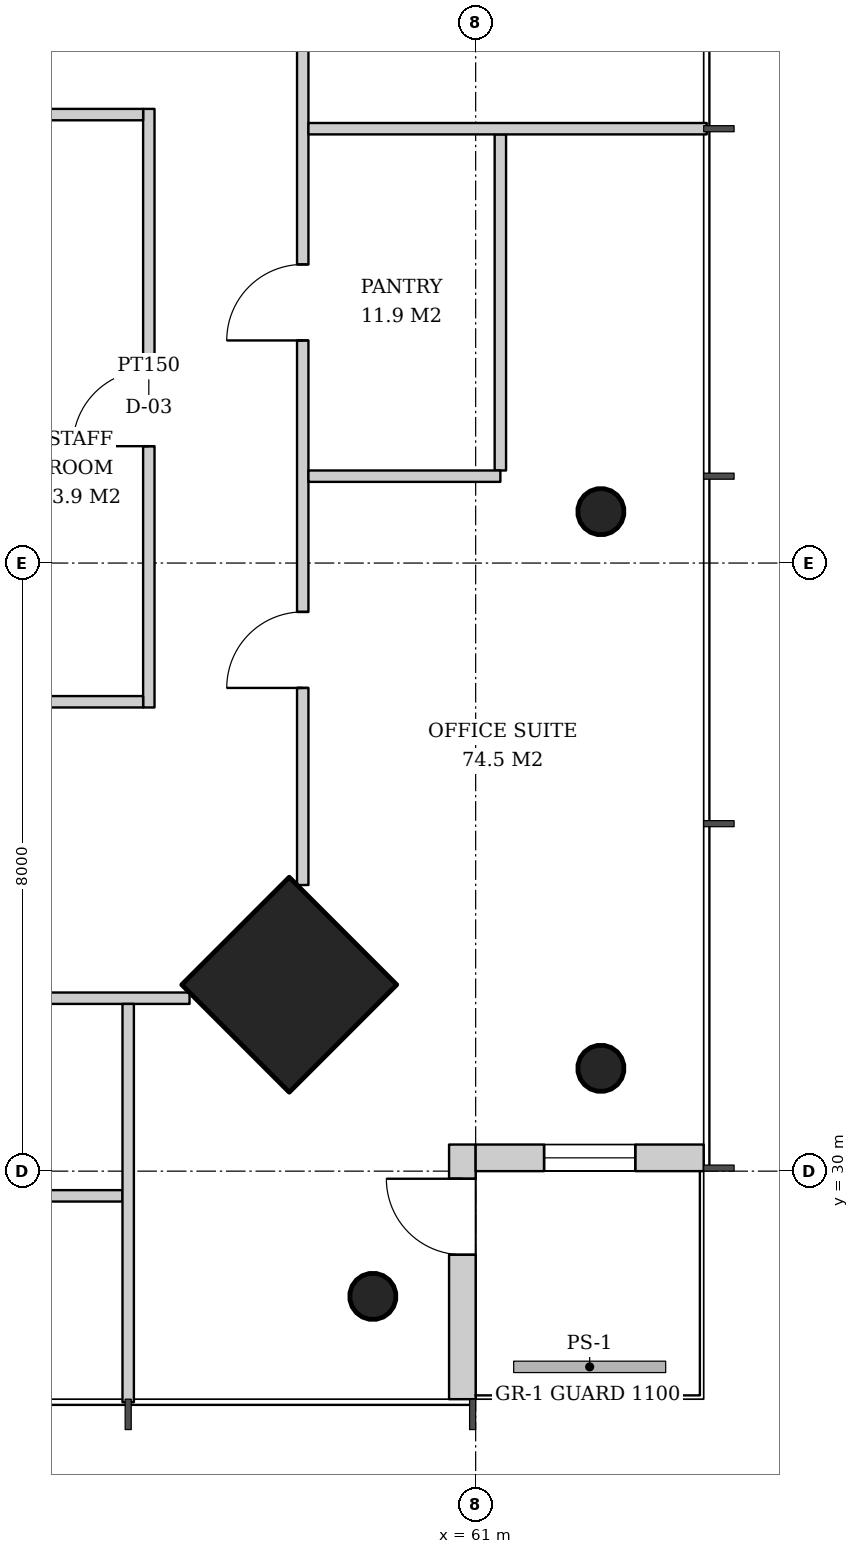
"""IFC4 building model, lengths in metres.
Left out: names, types, materials, properties, quantities, classifications, styles, units other than length and angle.
Written with IfcOpenShell. Run it as: python <this file> out.ifc"""

import sys

from ifc_helpers import new_model, si_unit, direction, frame, frame_2d, origin, origin_2d, place, context, subcontext, project, spatial, rectangle, hollow_circle, extrude, element, fill, save


model = new_model("IFC4")
c1 = context("Model", 3, precision=1e-05, world=origin(), true_north=direction((0.0, 1.0)))
c2 = subcontext(c1, "Body", "Model", "MODEL_VIEW")
j1 = project(units=[si_unit("LENGTHUNIT", "METRE"), si_unit("PLANEANGLEUNIT", "RADIAN")], contexts=[c1])
p1 = place(None, origin())
s1 = spatial("IfcSite", under=j1, at=p1, CompositionType="ELEMENT")
p2 = place(p1, origin())
s2 = spatial("IfcBuilding", under=s1, at=p2, CompositionType="ELEMENT")
p3 = place(p2, frame((0.0, 0.0, 218.6)))
s3 = spatial("IfcBuildingStorey", under=s2, at=p3, CompositionType="ELEMENT", Elevation=218.6)
p4 = place(p3, frame((62.686, 31.314, 0.0), z_axis=(-0.031964207655, 0.031964207655, 0.998977766949), x_axis=(-0.707106781187, -0.707106781187, 0.0)))
e1 = element("IfcColumn", 1, at=p4, inside=s3, PredefinedType="COLUMN", context=c2, shape_type="SweptSolid", body=[
    extrude(hollow_circle(Radius=0.305, WallThickness=0.025, at=origin_2d()), origin(), (0.0, 0.0, 1.0), 3.804),
])
p5 = place(p3, frame((62.686, 38.657, 0.0), z_axis=(-0.031976494272, 0.015924037308, 0.99936176075), x_axis=(-0.445775033553, -0.895145027055, 0.0)))
e2 = element("IfcColumn", 2, at=p5, inside=s3, PredefinedType="COLUMN", context=c2, shape_type="SweptSolid", body=[
    extrude(hollow_circle(Radius=0.305, WallThickness=0.025, at=origin_2d()), origin(), (0.0, 0.0, 1.0), 3.802),
])
p6 = place(p3, frame((58.586, 32.414, 0.0), z_axis=(-0.031900153262, 0.031900153262, 0.998981861919), x_axis=(-0.707106781187, -0.707106781187, 0.0)))
e3 = element("IfcColumn", 3, at=p6, inside=s3, PredefinedType="COLUMN", context=c2, shape_type="SweptSolid", body=[
    extrude(rectangle(XDim=2.0, YDim=2.0, at=origin_2d()), origin(), (0.0, 0.0, 1.0), 3.804),
])
p7 = place(p3, frame((59.686, 28.314, 0.0), z_axis=(-0.031964207655, 0.031964207655, 0.998977766949), x_axis=(-0.707106781187, -0.707106781187, 0.0)))
e4 = element("IfcColumn", 4, at=p7, inside=s3, PredefinedType="COLUMN", context=c2, shape_type="SweptSolid", body=[
    extrude(hollow_circle(Radius=0.305, WallThickness=0.025, at=origin_2d()), origin(), (0.0, 0.0, 1.0), 3.804),
])
p8 = place(p3, frame((60.825, 27.0, 0.0), z_axis=(0.0, 0.0, 1.0), x_axis=(0.0, 1.0, 0.0)))
e5 = element("IfcWall", 5, at=p8, inside=s3, PredefinedType="SOLIDWALL", context=c2, shape_type="SweptSolid", body=[
    extrude(rectangle(XDim=3.35, YDim=0.35, at=frame_2d((1.675, 0.0))), origin(), (0.0, 0.0, 1.0), 3.62),
])
p9 = place(p8, frame((1.9, 0.0, 0.0)))
e6 = element("IfcOpeningElement", 6, at=p9, cuts=e5, PredefinedType="OPENING", context=c2, shape_type="SweptSolid", body=[
    extrude(rectangle(XDim=1.0, YDim=2.4, at=frame_2d((0.5, 1.2))), frame((0.0, 0.185, 0.0), z_axis=(0.0, -1.0, 0.0), x_axis=(1.0, 0.0, 0.0)), (0.0, 0.0, 1.0), 0.37),
])
p10 = place(p3, frame((61.0, 30.175, 0.0), z_axis=(0.0, 0.0, 1.0), x_axis=(1.0, 0.0, 0.0)))
e7 = element("IfcWall", 7, at=p10, inside=s3, PredefinedType="SOLIDWALL", context=c2, shape_type="SweptSolid", body=[
    extrude(rectangle(XDim=3.0, YDim=0.35, at=frame_2d((1.5, 0.0))), origin(), (0.0, 0.0, 1.0), 3.62),
])
p11 = place(p10, frame((0.9, 0.0, 0.6)))
e8 = element("IfcOpeningElement", 8, at=p11, cuts=e7, PredefinedType="OPENING", context=c2, shape_type="SweptSolid", body=[
    extrude(rectangle(XDim=1.2, YDim=2.55, at=frame_2d((0.6, 1.275))), frame((0.0, 0.185, 0.0), z_axis=(0.0, -1.0, 0.0), x_axis=(1.0, 0.0, 0.0)), (0.0, 0.0, 1.0), 0.37),
])
p12 = place(p3, frame((56.7, 36.1, 0.0), z_axis=(0.0, 0.0, 1.0), x_axis=(0.0, 1.0, 0.0)))
e9 = element("IfcWall", 9, at=p12, inside=s3, PredefinedType="PARTITIONING", context=c2, shape_type="SweptSolid", body=[
    extrude(rectangle(XDim=7.875, YDim=0.15, at=frame_2d((3.938, 0.0))), origin(), (0.0, 0.0, 1.0), 2.867),
])
p13 = place(p12, frame((3.438, 0.0, 0.0)))
e10 = element("IfcOpeningElement", 10, at=p13, cuts=e9, PredefinedType="OPENING", context=c2, shape_type="SweptSolid", body=[
    extrude(rectangle(XDim=1.0, YDim=2.1, at=frame_2d((0.5, 1.05))), frame((0.0, 0.085, 0.0), z_axis=(0.0, -1.0, 0.0), x_axis=(1.0, 0.0, 0.0)), (0.0, 0.0, 1.0), 0.17),
])
p14 = place(p3, frame((54.9, 36.175, 0.0), z_axis=(0.0, 0.0, 1.0), x_axis=(1.0, 0.0, 0.0)))
e11 = element("IfcWall", 11, at=p14, inside=s3, PredefinedType="PARTITIONING", context=c2, shape_type="SweptSolid", body=[
    extrude(rectangle(XDim=1.725, YDim=0.15, at=frame_2d((0.863, 0.0))), origin(), (0.0, 0.0, 1.0), 2.92),
])
p15 = place(p3, frame((54.9, 43.9, 0.0), z_axis=(0.0, 0.0, 1.0), x_axis=(1.0, 0.0, 0.0)))
e12 = element("IfcWall", 12, at=p15, inside=s3, PredefinedType="PARTITIONING", context=c2, shape_type="SweptSolid", body=[
    extrude(rectangle(XDim=1.725, YDim=0.15, at=frame_2d((0.863, 0.0))), origin(), (0.0, 0.0, 1.0), 3.62),
])
p16 = place(p3, frame((61.325, 39.218, 0.0), z_axis=(0.0, 0.0, 1.0), x_axis=(0.0, 1.0, 0.0)))
e13 = element("IfcWall", 13, at=p16, inside=s3, PredefinedType="PARTITIONING", context=c2, shape_type="SweptSolid", body=[
    extrude(rectangle(XDim=4.422, YDim=0.15, at=frame_2d((2.211, 0.0))), origin(), (0.0, 0.0, 1.0), 2.867),
])
p17 = place(p3, frame((58.725, 33.764, 0.0), z_axis=(0.0, 0.0, 1.0), x_axis=(0.0, 1.0, 0.0)))
e14 = element("IfcWall", 14, at=p17, inside=s3, PredefinedType="PARTITIONING", context=c2, shape_type="SweptSolid", body=[
    extrude(rectangle(XDim=24.472, YDim=0.15, at=frame_2d((12.236, 0.0))), origin(), (0.0, 0.0, 1.0), 2.867),
])
p18 = place(p17, frame((2.593, 0.0, 0.0)))
e15 = element("IfcOpeningElement", 15, at=p18, cuts=e14, PredefinedType="OPENING", context=c2, shape_type="SweptSolid", body=[
    extrude(rectangle(XDim=1.0, YDim=2.1, at=frame_2d((0.5, 1.05))), frame((0.0, 0.085, 0.0), z_axis=(0.0, -1.0, 0.0), x_axis=(1.0, 0.0, 0.0)), (0.0, 0.0, 1.0), 0.17),
])
p19 = place(p17, frame((7.164, 0.0, 0.0)))
e16 = element("IfcOpeningElement", 16, at=p19, cuts=e14, PredefinedType="OPENING", context=c2, shape_type="SweptSolid", body=[
    extrude(rectangle(XDim=1.0, YDim=2.1, at=frame_2d((0.5, 1.05))), frame((0.0, 0.085, 0.0), z_axis=(0.0, -1.0, 0.0), x_axis=(1.0, 0.0, 0.0)), (0.0, 0.0, 1.0), 0.17),
])
p20 = place(p17, frame((11.736, 0.0, 0.0)))
e17 = element("IfcOpeningElement", 17, at=p20, cuts=e14, PredefinedType="OPENING", context=c2, shape_type="SweptSolid", body=[
    extrude(rectangle(XDim=1.0, YDim=2.1, at=frame_2d((0.5, 1.05))), frame((0.0, 0.085, 0.0), z_axis=(0.0, -1.0, 0.0), x_axis=(1.0, 0.0, 0.0)), (0.0, 0.0, 1.0), 0.17),
])
p21 = place(p17, frame((16.307, 0.0, 0.0)))
e18 = element("IfcOpeningElement", 18, at=p21, cuts=e14, PredefinedType="OPENING", context=c2, shape_type="SweptSolid", body=[
    extrude(rectangle(XDim=1.0, YDim=2.1, at=frame_2d((0.5, 1.05))), frame((0.0, 0.085, 0.0), z_axis=(0.0, -1.0, 0.0), x_axis=(1.0, 0.0, 0.0)), (0.0, 0.0, 1.0), 0.17),
])
p22 = place(p17, frame((20.879, 0.0, 0.0)))
e19 = element("IfcOpeningElement", 19, at=p22, cuts=e14, PredefinedType="OPENING", context=c2, shape_type="SweptSolid", body=[
    extrude(rectangle(XDim=1.0, YDim=2.1, at=frame_2d((0.5, 1.05))), frame((0.0, 0.085, 0.0), z_axis=(0.0, -1.0, 0.0), x_axis=(1.0, 0.0, 0.0)), (0.0, 0.0, 1.0), 0.17),
])
p23 = place(p3, frame((58.8, 39.143, 0.0), z_axis=(0.0, 0.0, 1.0), x_axis=(1.0, 0.0, 0.0)))
e20 = element("IfcWall", 20, at=p23, inside=s3, PredefinedType="PARTITIONING", context=c2, shape_type="SweptSolid", body=[
    extrude(rectangle(XDim=2.525, YDim=0.15, at=frame_2d((1.262, 0.0))), origin(), (0.0, 0.0, 1.0), 3.62),
])
p24 = place(p3, frame((58.8, 43.714, 0.0), z_axis=(0.0, 0.0, 1.0), x_axis=(1.0, 0.0, 0.0)))
e21 = element("IfcWall", 21, at=p24, inside=s3, PredefinedType="PARTITIONING", context=c2, shape_type="SweptSolid", body=[
    extrude(rectangle(XDim=5.24, YDim=0.15, at=frame_2d((2.62, 0.0))), origin(), (0.0, 0.0, 1.0), 3.12),
])
p25 = place(p3, frame((51.932, 29.675, 0.0), z_axis=(0.0, 0.0, 1.0), x_axis=(1.0, 0.0, 0.0)))
e22 = element("IfcWall", 22, at=p25, inside=s3, PredefinedType="PARTITIONING", context=c2, shape_type="SweptSolid", body=[
    extrude(rectangle(XDim=4.421, YDim=0.15, at=frame_2d((2.211, 0.0))), origin(), (0.0, 0.0, 1.0), 2.867),
])
p26 = place(p3, frame((32.764, 32.275, 0.0), z_axis=(0.0, 0.0, 1.0), x_axis=(1.0, 0.0, 0.0)))
e23 = element("IfcWall", 23, at=p26, inside=s3, PredefinedType="PARTITIONING", context=c2, shape_type="SweptSolid", body=[
    extrude(rectangle(XDim=24.472, YDim=0.15, at=frame_2d((12.236, 0.0))), origin(), (0.0, 0.0, 1.0), 2.867),
])
p27 = place(p26, frame((2.593, 0.0, 0.0)))
e24 = element("IfcOpeningElement", 24, at=p27, cuts=e23, PredefinedType="OPENING", context=c2, shape_type="SweptSolid", body=[
    extrude(rectangle(XDim=1.0, YDim=2.1, at=frame_2d((0.5, 1.05))), frame((0.0, 0.085, 0.0), z_axis=(0.0, -1.0, 0.0), x_axis=(1.0, 0.0, 0.0)), (0.0, 0.0, 1.0), 0.17),
])
p28 = place(p26, frame((7.164, 0.0, 0.0)))
e25 = element("IfcOpeningElement", 25, at=p28, cuts=e23, PredefinedType="OPENING", context=c2, shape_type="SweptSolid", body=[
    extrude(rectangle(XDim=1.0, YDim=2.1, at=frame_2d((0.5, 1.05))), frame((0.0, 0.085, 0.0), z_axis=(0.0, -1.0, 0.0), x_axis=(1.0, 0.0, 0.0)), (0.0, 0.0, 1.0), 0.17),
])
p29 = place(p26, frame((11.736, 0.0, 0.0)))
e26 = element("IfcOpeningElement", 26, at=p29, cuts=e23, PredefinedType="OPENING", context=c2, shape_type="SweptSolid", body=[
    extrude(rectangle(XDim=1.0, YDim=2.1, at=frame_2d((0.5, 1.05))), frame((0.0, 0.085, 0.0), z_axis=(0.0, -1.0, 0.0), x_axis=(1.0, 0.0, 0.0)), (0.0, 0.0, 1.0), 0.17),
])
p30 = place(p26, frame((16.307, 0.0, 0.0)))
e27 = element("IfcOpeningElement", 27, at=p30, cuts=e23, PredefinedType="OPENING", context=c2, shape_type="SweptSolid", body=[
    extrude(rectangle(XDim=1.0, YDim=2.1, at=frame_2d((0.5, 1.05))), frame((0.0, 0.085, 0.0), z_axis=(0.0, -1.0, 0.0), x_axis=(1.0, 0.0, 0.0)), (0.0, 0.0, 1.0), 0.17),
])
p31 = place(p26, frame((20.879, 0.0, 0.0)))
e28 = element("IfcOpeningElement", 28, at=p31, cuts=e23, PredefinedType="OPENING", context=c2, shape_type="SweptSolid", body=[
    extrude(rectangle(XDim=1.0, YDim=2.1, at=frame_2d((0.5, 1.05))), frame((0.0, 0.085, 0.0), z_axis=(0.0, -1.0, 0.0), x_axis=(1.0, 0.0, 0.0)), (0.0, 0.0, 1.0), 0.17),
])
p32 = place(p3, frame((56.428, 32.2, 0.0), z_axis=(0.0, 0.0, 1.0), x_axis=(0.0, -1.0, 0.0)))
e29 = element("IfcWall", 29, at=p32, inside=s3, PredefinedType="PARTITIONING", context=c2, shape_type="SweptSolid", body=[
    extrude(rectangle(XDim=5.24, YDim=0.15, at=frame_2d((2.62, 0.0))), origin(), (0.0, 0.0, 1.0), 3.12),
])
p33 = place(p9, origin())
e30 = element("IfcDoor", 30, at=p33, inside=s3, OperationType="SINGLE_SWING_RIGHT", PredefinedType="DOOR", context=c2, shape_type="SweptSolid", body=[
    extrude(rectangle(XDim=1.0, YDim=2.4, at=frame_2d((0.5, 1.2))), frame((0.0, 0.025, 0.0), z_axis=(0.0, -1.0, 0.0), x_axis=(1.0, 0.0, 0.0)), (0.0, 0.0, 1.0), 0.05),
])
fill(e6, e30)
p34 = place(p11, origin())
e31 = element("IfcWindow", 31, at=p34, inside=s3, PartitioningType="SINGLE_PANEL", PredefinedType="WINDOW", context=c2, shape_type="SweptSolid", body=[
    extrude(rectangle(XDim=1.2, YDim=2.55, at=frame_2d((0.6, 1.275))), frame((0.0, 0.03, 0.0), z_axis=(0.0, -1.0, 0.0), x_axis=(1.0, 0.0, 0.0)), (0.0, 0.0, 1.0), 0.06),
])
fill(e8, e31)
p35 = place(p13, origin())
e32 = element("IfcDoor", 32, at=p35, inside=s3, OperationType="SINGLE_SWING_LEFT", PredefinedType="DOOR", context=c2, shape_type="SweptSolid", body=[
    extrude(rectangle(XDim=1.0, YDim=2.1, at=frame_2d((0.5, 1.05))), frame((0.0, 0.025, 0.0), z_axis=(0.0, -1.0, 0.0), x_axis=(1.0, 0.0, 0.0)), (0.0, 0.0, 1.0), 0.05),
])
fill(e10, e32)
p36 = place(p18, origin())
e33 = element("IfcDoor", 33, at=p36, inside=s3, OperationType="SINGLE_SWING_LEFT", PredefinedType="DOOR", context=c2, shape_type="SweptSolid", body=[
    extrude(rectangle(XDim=1.0, YDim=2.1, at=frame_2d((0.5, 1.05))), frame((0.0, 0.025, 0.0), z_axis=(0.0, -1.0, 0.0), x_axis=(1.0, 0.0, 0.0)), (0.0, 0.0, 1.0), 0.05),
])
fill(e15, e33)
p37 = place(p19, origin())
e34 = element("IfcDoor", 34, at=p37, inside=s3, OperationType="SINGLE_SWING_LEFT", PredefinedType="DOOR", context=c2, shape_type="SweptSolid", body=[
    extrude(rectangle(XDim=1.0, YDim=2.1, at=frame_2d((0.5, 1.05))), frame((0.0, 0.025, 0.0), z_axis=(0.0, -1.0, 0.0), x_axis=(1.0, 0.0, 0.0)), (0.0, 0.0, 1.0), 0.05),
])
fill(e16, e34)
save(model, sys.argv[1])
